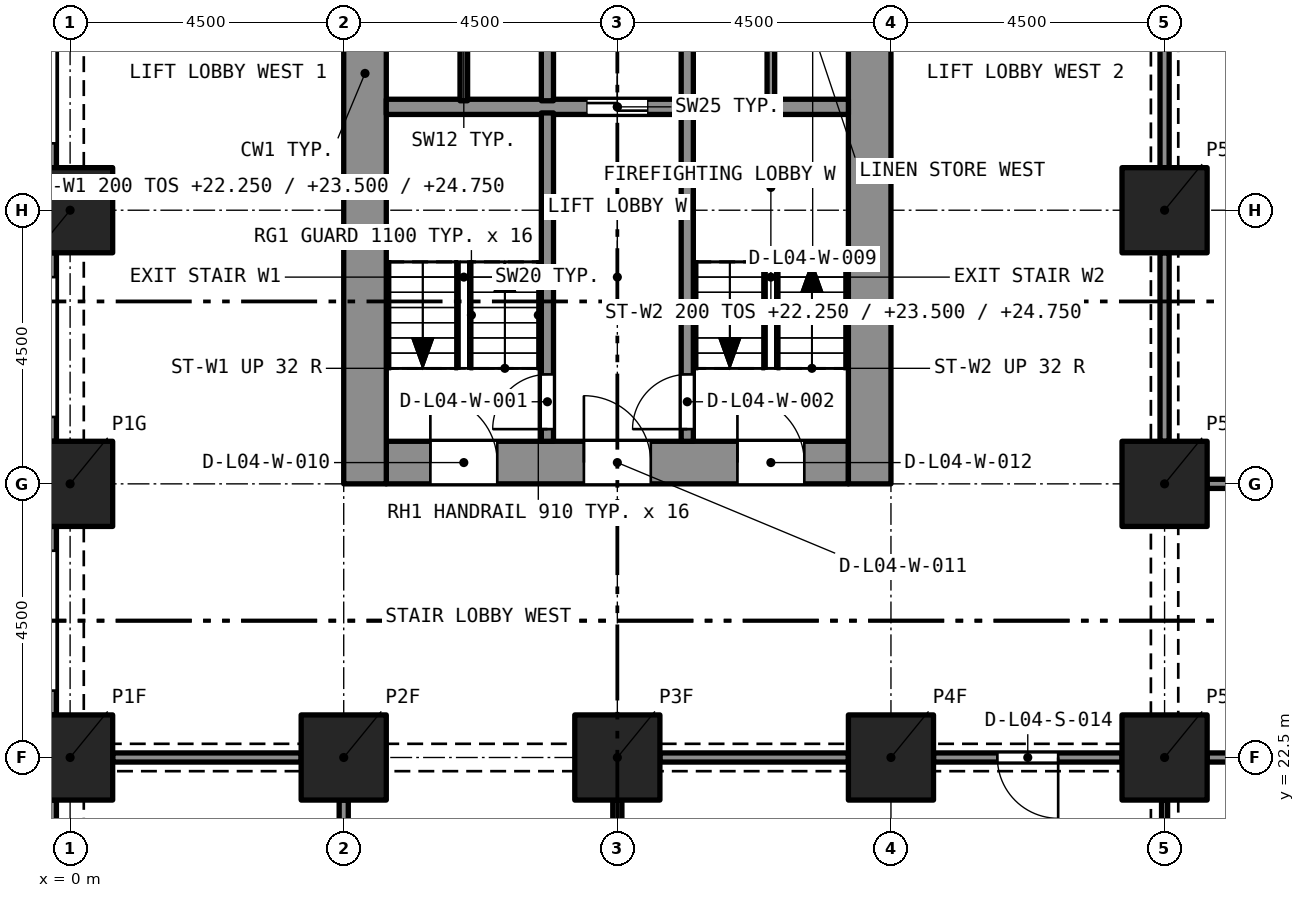
"""IFC4 building model, lengths in metres.
Left out: names, types, materials, properties, quantities, classifications, styles, units other than length and angle.
Written with IfcOpenShell. Run it as: python <this file> out.ifc"""

import sys

from ifc_helpers import new_model, si_unit, direction, frame, frame_2d, origin, origin_2d, place, context, subcontext, project, spatial, rectangle, extrude, element, fill, save


model = new_model("IFC4")
c1 = context("Model", 3, precision=1e-05, world=origin(), true_north=direction((0.0, 1.0)))
c2 = subcontext(c1, "Body", "Model", "MODEL_VIEW")
j1 = project(units=[si_unit("LENGTHUNIT", "METRE"), si_unit("PLANEANGLEUNIT", "RADIAN")], contexts=[c1])
p1 = place(None, origin())
s1 = spatial("IfcSite", under=j1, at=p1, CompositionType="ELEMENT")
p2 = place(p1, origin())
s2 = spatial("IfcBuilding", under=s1, at=p2, CompositionType="ELEMENT")
p3 = place(p2, frame((0.0, 0.0, 21.0)))
s3 = spatial("IfcBuildingStorey", under=s2, at=p3, CompositionType="ELEMENT", Elevation=21.0)
for number, where, z_axis, x_axis in (
    (1, (0.0, 22.5, 0.0), (0.0, 0.0, 1.0), (1.0, 0.0, 0.0)),
    (2, (4.5, 22.5, 0.0), (0.0, 0.0, 1.0), (1.0, 0.0, 0.0)),
    (3, (9.0, 22.5, 0.0), (0.0, 0.0, 1.0), (1.0, 0.0, 0.0)),
    (4, (13.5, 22.5, 0.0), (0.0, 0.0, 1.0), (1.0, 0.0, 0.0)),
    (5, (18.0, 22.5, 0.0), (0.0, 0.0, 1.0), (1.0, 0.0, 0.0)),
    (6, (0.0, 27.0, 0.0), (0.0, 0.0, 1.0), (1.0, 0.0, 0.0)),
    (7, (18.0, 27.0, 0.0), (0.0, 0.0, 1.0), (1.0, 0.0, 0.0)),
    (8, (0.0, 31.5, 0.0), (0.0, 0.0, 1.0), (1.0, 0.0, 0.0)),
    (9, (18.0, 31.5, 0.0), (0.0, 0.0, 1.0), (1.0, 0.0, 0.0)),
):
    element("IfcColumn", number, at=place(p3, frame(where, z_axis=z_axis, x_axis=x_axis)), inside=s3, PredefinedType="COLUMN", context=c2, shape_type="SweptSolid", body=[
        extrude(rectangle(XDim=1.4, YDim=1.4, at=origin_2d()), origin(), (0.0, 0.0, 1.0), 5.0),
    ])
p4 = place(p3, frame((5.2, 27.35, 0.0), z_axis=(0.0, 0.0, 1.0), x_axis=(1.0, 0.0, 0.0)))
e10 = element("IfcWall", 10, at=p4, inside=s3, PredefinedType="SOLIDWALL", context=c2, shape_type="SweptSolid", body=[
    extrude(rectangle(XDim=7.6, YDim=0.7, at=frame_2d((3.8, 0.0))), origin(), (0.0, 0.0, 1.0), 5.0),
])
p5 = place(p4, frame((0.725, 0.0, 0.0)))
e11 = element("IfcOpeningElement", 11, at=p5, cuts=e10, PredefinedType="OPENING", context=c2, shape_type="SweptSolid", body=[
    extrude(rectangle(XDim=1.1, YDim=2.1, at=frame_2d((0.55, 1.05))), frame((0.0, 0.36, 0.0), z_axis=(0.0, -1.0, 0.0), x_axis=(1.0, 0.0, 0.0)), (0.0, 0.0, 1.0), 0.72),
])
p6 = place(p4, frame((3.25, 0.0, 0.0)))
e12 = element("IfcOpeningElement", 12, at=p6, cuts=e10, PredefinedType="OPENING", context=c2, shape_type="SweptSolid", body=[
    extrude(rectangle(XDim=1.1, YDim=2.1, at=frame_2d((0.55, 1.05))), frame((0.0, 0.36, 0.0), z_axis=(0.0, -1.0, 0.0), x_axis=(1.0, 0.0, 0.0)), (0.0, 0.0, 1.0), 0.72),
])
p7 = place(p4, frame((5.775, 0.0, 0.0)))
e13 = element("IfcOpeningElement", 13, at=p7, cuts=e10, PredefinedType="OPENING", context=c2, shape_type="SweptSolid", body=[
    extrude(rectangle(XDim=1.1, YDim=2.1, at=frame_2d((0.55, 1.05))), frame((0.0, 0.36, 0.0), z_axis=(0.0, -1.0, 0.0), x_axis=(1.0, 0.0, 0.0)), (0.0, 0.0, 1.0), 0.72),
])
p8 = place(p3, frame((4.85, 27.0, 0.0), z_axis=(0.0, 0.0, 1.0), x_axis=(0.0, 1.0, 0.0)))
e14 = element("IfcWall", 14, at=p8, inside=s3, PredefinedType="SOLIDWALL", context=c2, shape_type="SweptSolid", body=[
    extrude(rectangle(XDim=13.5, YDim=0.7, at=frame_2d((6.75, 0.0))), origin(), (0.0, 0.0, 1.0), 5.0),
])
p9 = place(p8, frame((8.95, 0.0, 0.0)))
e15 = element("IfcOpeningElement", 15, at=p9, cuts=e14, PredefinedType="OPENING", context=c2, shape_type="SweptSolid", body=[
    extrude(rectangle(XDim=1.2, YDim=2.1, at=frame_2d((0.6, 1.05))), frame((0.0, 0.36, 0.0), z_axis=(0.0, -1.0, 0.0), x_axis=(1.0, 0.0, 0.0)), (0.0, 0.0, 1.0), 0.72),
])
p10 = place(p3, frame((13.15, 27.0, 0.0), z_axis=(0.0, 0.0, 1.0), x_axis=(0.0, 1.0, 0.0)))
e16 = element("IfcWall", 16, at=p10, inside=s3, PredefinedType="SOLIDWALL", context=c2, shape_type="SweptSolid", body=[
    extrude(rectangle(XDim=13.5, YDim=0.7, at=frame_2d((6.75, 0.0))), origin(), (0.0, 0.0, 1.0), 5.0),
])
p11 = place(p10, frame((11.1, 0.0, 0.0)))
e17 = element("IfcOpeningElement", 17, at=p11, cuts=e16, PredefinedType="OPENING", context=c2, shape_type="SweptSolid", body=[
    extrude(rectangle(XDim=1.1, YDim=2.1, at=frame_2d((0.55, 1.05))), frame((0.0, 0.36, 0.0), z_axis=(0.0, -1.0, 0.0), x_axis=(1.0, 0.0, 0.0)), (0.0, 0.0, 1.0), 0.72),
])
p12 = place(p10, frame((8.95, 0.0, 0.0)))
e18 = element("IfcOpeningElement", 18, at=p12, cuts=e16, PredefinedType="OPENING", context=c2, shape_type="SweptSolid", body=[
    extrude(rectangle(XDim=1.2, YDim=2.1, at=frame_2d((0.6, 1.05))), frame((0.0, 0.36, 0.0), z_axis=(0.0, -1.0, 0.0), x_axis=(1.0, 0.0, 0.0)), (0.0, 0.0, 1.0), 0.72),
])
p13 = place(p3, frame((-0.375, 32.2, 0.0), z_axis=(0.0, 0.0, 1.0), x_axis=(0.0, 1.0, 0.0)))
e19 = element("IfcWall", 19, at=p13, inside=s3, PredefinedType="SOLIDWALL", context=c2, shape_type="SweptSolid", body=[
    extrude(rectangle(XDim=3.1, YDim=0.3, at=frame_2d((1.55, 0.0))), origin(), (0.0, 0.0, 1.0), 5.0),
])
p14 = place(p13, frame((0.4, 0.0, 0.45)))
e20 = element("IfcOpeningElement", 20, at=p14, cuts=e19, PredefinedType="OPENING", context=c2, shape_type="SweptSolid", body=[
    extrude(rectangle(XDim=2.3, YDim=3.3, at=frame_2d((1.15, 1.65))), frame((0.0, 0.16, 0.0), z_axis=(0.0, -1.0, 0.0), x_axis=(1.0, 0.0, 0.0)), (0.0, 0.0, 1.0), 0.32),
])
p15 = place(p3, frame((-0.375, 27.7, 0.0), z_axis=(0.0, 0.0, 1.0), x_axis=(0.0, 1.0, 0.0)))
e21 = element("IfcWall", 21, at=p15, inside=s3, PredefinedType="SOLIDWALL", context=c2, shape_type="SweptSolid", body=[
    extrude(rectangle(XDim=3.1, YDim=0.3, at=frame_2d((1.55, 0.0))), origin(), (0.0, 0.0, 1.0), 5.0),
])
p16 = place(p15, frame((0.4, 0.0, 0.45)))
e22 = element("IfcOpeningElement", 22, at=p16, cuts=e21, PredefinedType="OPENING", context=c2, shape_type="SweptSolid", body=[
    extrude(rectangle(XDim=2.3, YDim=3.3, at=frame_2d((1.15, 1.65))), frame((0.0, 0.16, 0.0), z_axis=(0.0, -1.0, 0.0), x_axis=(1.0, 0.0, 0.0)), (0.0, 0.0, 1.0), 0.32),
])
p17 = place(p3, frame((-0.375, 23.2, 0.0), z_axis=(0.0, 0.0, 1.0), x_axis=(0.0, 1.0, 0.0)))
e23 = element("IfcWall", 23, at=p17, inside=s3, PredefinedType="SOLIDWALL", context=c2, shape_type="SweptSolid", body=[
    extrude(rectangle(XDim=3.1, YDim=0.3, at=frame_2d((1.55, 0.0))), origin(), (0.0, 0.0, 1.0), 5.0),
])
p18 = place(p17, frame((0.4, 0.0, 0.45)))
e24 = element("IfcOpeningElement", 24, at=p18, cuts=e23, PredefinedType="OPENING", context=c2, shape_type="SweptSolid", body=[
    extrude(rectangle(XDim=2.3, YDim=3.3, at=frame_2d((1.15, 1.65))), frame((0.0, 0.16, 0.0), z_axis=(0.0, -1.0, 0.0), x_axis=(1.0, 0.0, 0.0)), (0.0, 0.0, 1.0), 0.32),
])
p19 = place(p3, frame((-0.375, 18.7, 0.0), z_axis=(0.0, 0.0, 1.0), x_axis=(0.0, 1.0, 0.0)))
e25 = element("IfcWall", 25, at=p19, inside=s3, PredefinedType="SOLIDWALL", context=c2, shape_type="SweptSolid", body=[
    extrude(rectangle(XDim=3.1, YDim=0.3, at=frame_2d((1.55, 0.0))), origin(), (0.0, 0.0, 1.0), 5.0),
])
p20 = place(p19, frame((0.4, 0.0, 0.45)))
e26 = element("IfcOpeningElement", 26, at=p20, cuts=e25, PredefinedType="OPENING", context=c2, shape_type="SweptSolid", body=[
    extrude(rectangle(XDim=2.3, YDim=3.3, at=frame_2d((1.15, 1.65))), frame((0.0, 0.16, 0.0), z_axis=(0.0, -1.0, 0.0), x_axis=(1.0, 0.0, 0.0)), (0.0, 0.0, 1.0), 0.32),
])
p21 = place(p3, frame((5.2, 33.2, 0.0), z_axis=(0.0, 0.0, 1.0), x_axis=(1.0, 0.0, 0.0)))
e27 = element("IfcWall", 27, at=p21, inside=s3, PredefinedType="SOLIDWALL", context=c2, shape_type="SweptSolid", body=[
    extrude(rectangle(XDim=7.6, YDim=0.25, at=frame_2d((3.8, 0.0))), origin(), (0.0, 0.0, 1.0), 4.65),
])
p22 = place(p21, frame((3.3, 0.0, 0.0)))
e28 = element("IfcOpeningElement", 28, at=p22, cuts=e27, PredefinedType="OPENING", context=c2, shape_type="SweptSolid", body=[
    extrude(rectangle(XDim=1.0, YDim=2.1, at=frame_2d((0.5, 1.05))), frame((0.0, 0.135, 0.0), z_axis=(0.0, -1.0, 0.0), x_axis=(1.0, 0.0, 0.0)), (0.0, 0.0, 1.0), 0.27),
])
p23 = place(p3, frame((7.85, 27.7, 0.0), z_axis=(0.0, 0.0, 1.0), x_axis=(0.0, 1.0, 0.0)))
e29 = element("IfcWall", 29, at=p23, inside=s3, PredefinedType="SOLIDWALL", context=c2, shape_type="SweptSolid", body=[
    extrude(rectangle(XDim=5.4, YDim=0.2, at=frame_2d((2.7, 0.0))), origin(), (0.0, 0.0, 1.0), 4.65),
])
p24 = place(p23, frame((0.2, 0.0, 0.0)))
e30 = element("IfcOpeningElement", 30, at=p24, cuts=e29, PredefinedType="OPENING", context=c2, shape_type="SweptSolid", body=[
    extrude(rectangle(XDim=0.9, YDim=2.1, at=frame_2d((0.45, 1.05))), frame((0.0, 0.11, 0.0), z_axis=(0.0, -1.0, 0.0), x_axis=(1.0, 0.0, 0.0)), (0.0, 0.0, 1.0), 0.22),
])
p25 = place(p3, frame((10.15, 27.7, 0.0), z_axis=(0.0, 0.0, 1.0), x_axis=(0.0, 1.0, 0.0)))
e31 = element("IfcWall", 31, at=p25, inside=s3, PredefinedType="SOLIDWALL", context=c2, shape_type="SweptSolid", body=[
    extrude(rectangle(XDim=5.4, YDim=0.2, at=frame_2d((2.7, 0.0))), origin(), (0.0, 0.0, 1.0), 4.65),
])
p26 = place(p25, frame((0.2, 0.0, 0.0)))
e32 = element("IfcOpeningElement", 32, at=p26, cuts=e31, PredefinedType="OPENING", context=c2, shape_type="SweptSolid", body=[
    extrude(rectangle(XDim=0.9, YDim=2.1, at=frame_2d((0.45, 1.05))), frame((0.0, 0.11, 0.0), z_axis=(0.0, -1.0, 0.0), x_axis=(1.0, 0.0, 0.0)), (0.0, 0.0, 1.0), 0.22),
])
for number, where, z_axis, x_axis in (
    (33, (7.85, 33.3, 0.0), (0.0, 0.0, 1.0), (0.0, 1.0, 0.0)),
    (34, (10.15, 33.3, 0.0), (0.0, 0.0, 1.0), (0.0, 1.0, 0.0)),
):
    element("IfcWall", number, at=place(p3, frame(where, z_axis=z_axis, x_axis=x_axis)), inside=s3, PredefinedType="SOLIDWALL", context=c2, shape_type="SweptSolid", body=[
        extrude(rectangle(XDim=2.3, YDim=0.2, at=frame_2d((1.15, 0.0))), origin(), (0.0, 0.0, 1.0), 4.65),
    ])
for number, where, z_axis, x_axis in (
    (35, (6.475, 33.3, 0.0), (0.0, 0.0, 1.0), (0.0, 1.0, 0.0)),
    (36, (11.525, 33.3, 0.0), (0.0, 0.0, 1.0), (0.0, 1.0, 0.0)),
):
    element("IfcWall", number, at=place(p3, frame(where, z_axis=z_axis, x_axis=x_axis)), inside=s3, PredefinedType="PARTITIONING", context=c2, shape_type="SweptSolid", body=[
        extrude(rectangle(XDim=2.3, YDim=0.125, at=frame_2d((1.15, 0.0))), origin(), (0.0, 0.0, 1.0), 4.65),
    ])
p27 = place(p3, frame((18.7, 27.0, 0.0), z_axis=(0.0, 0.0, 1.0), x_axis=(1.0, 0.0, 0.0)))
e37 = element("IfcWall", 37, at=p27, inside=s3, PredefinedType="PARTITIONING", context=c2, shape_type="SweptSolid", body=[
    extrude(rectangle(XDim=12.1, YDim=0.15, at=frame_2d((6.05, 0.0))), origin(), (0.0, 0.0, 1.0), 4.55),
])
p28 = place(p27, frame((5.45, 0.0, 0.0)))
e38 = element("IfcOpeningElement", 38, at=p28, cuts=e37, PredefinedType="OPENING", context=c2, shape_type="SweptSolid", body=[
    extrude(rectangle(XDim=1.2, YDim=2.1, at=frame_2d((0.6, 1.05))), frame((0.0, 0.085, 0.0), z_axis=(0.0, -1.0, 0.0), x_axis=(1.0, 0.0, 0.0)), (0.0, 0.0, 1.0), 0.17),
])
p29 = place(p3, frame((30.8, 22.5, 0.0), z_axis=(0.0, 0.0, 1.0), x_axis=(-1.0, 0.0, 0.0)))
e39 = element("IfcWall", 39, at=p29, inside=s3, PredefinedType="PARTITIONING", context=c2, shape_type="SweptSolid", body=[
    extrude(rectangle(XDim=12.1, YDim=0.15, at=frame_2d((6.05, 0.0))), origin(), (0.0, 0.0, 1.0), 4.55),
])
p30 = place(p29, frame((5.45, 0.0, 0.0)))
e40 = element("IfcOpeningElement", 40, at=p30, cuts=e39, PredefinedType="OPENING", context=c2, shape_type="SweptSolid", body=[
    extrude(rectangle(XDim=1.2, YDim=2.1, at=frame_2d((0.6, 1.05))), frame((0.0, 0.085, 0.0), z_axis=(0.0, -1.0, 0.0), x_axis=(1.0, 0.0, 0.0)), (0.0, 0.0, 1.0), 0.17),
])
for number, where, z_axis, x_axis in (
    (41, (18.0, 27.7, 0.0), (0.0, 0.0, 1.0), (0.0, 1.0, 0.0)),
    (42, (18.0, 32.2, 0.0), (0.0, 0.0, 1.0), (0.0, 1.0, 0.0)),
):
    element("IfcWall", number, at=place(p3, frame(where, z_axis=z_axis, x_axis=x_axis)), inside=s3, PredefinedType="PARTITIONING", context=c2, shape_type="SweptSolid", body=[
        extrude(rectangle(XDim=3.1, YDim=0.15, at=frame_2d((1.55, 0.0))), origin(), (0.0, 0.0, 1.0), 4.18),
    ])
p31 = place(p3, frame((18.0, 18.7, 0.0), z_axis=(0.0, 0.0, 1.0), x_axis=(0.0, 1.0, 0.0)))
e43 = element("IfcWall", 43, at=p31, inside=s3, PredefinedType="PARTITIONING", context=c2, shape_type="SweptSolid", body=[
    extrude(rectangle(XDim=3.1, YDim=0.1, at=frame_2d((1.55, 0.0))), origin(), (0.0, 0.0, 1.0), 4.18),
])
p32 = place(p3, frame((17.3, 22.5, 0.0), z_axis=(0.0, 0.0, 1.0), x_axis=(-1.0, 0.0, 0.0)))
e44 = element("IfcWall", 44, at=p32, inside=s3, PredefinedType="PARTITIONING", context=c2, shape_type="SweptSolid", body=[
    extrude(rectangle(XDim=3.1, YDim=0.15, at=frame_2d((1.55, 0.0))), origin(), (0.0, 0.0, 1.0), 4.18),
])
p33 = place(p32, frame((1.05, 0.0, 0.0)))
e45 = element("IfcOpeningElement", 45, at=p33, cuts=e44, PredefinedType="OPENING", context=c2, shape_type="SweptSolid", body=[
    extrude(rectangle(XDim=1.0, YDim=2.1, at=frame_2d((0.5, 1.05))), frame((0.0, 0.085, 0.0), z_axis=(0.0, -1.0, 0.0), x_axis=(1.0, 0.0, 0.0)), (0.0, 0.0, 1.0), 0.17),
])
for number, where, z_axis, x_axis in (
    (46, (9.7, 22.5, 0.0), (0.0, 0.0, 1.0), (1.0, 0.0, 0.0)),
    (47, (0.7, 22.5, 0.0), (0.0, 0.0, 1.0), (1.0, 0.0, 0.0)),
):
    element("IfcWall", number, at=place(p3, frame(where, z_axis=z_axis, x_axis=x_axis)), inside=s3, PredefinedType="PARTITIONING", context=c2, shape_type="SweptSolid", body=[
        extrude(rectangle(XDim=3.1, YDim=0.15, at=frame_2d((1.55, 0.0))), origin(), (0.0, 0.0, 1.0), 4.18),
    ])
p34 = place(p3, frame((9.0, 21.8, 0.0), z_axis=(0.0, 0.0, 1.0), x_axis=(0.0, -1.0, 0.0)))
e48 = element("IfcWall", 48, at=p34, inside=s3, PredefinedType="PARTITIONING", context=c2, shape_type="SweptSolid", body=[
    extrude(rectangle(XDim=8.3, YDim=0.15, at=frame_2d((4.15, 0.0))), origin(), (0.0, 0.0, 1.0), 4.65),
])
p35 = place(p34, frame((3.55, 0.0, 0.0)))
e49 = element("IfcOpeningElement", 49, at=p35, cuts=e48, PredefinedType="OPENING", context=c2, shape_type="SweptSolid", body=[
    extrude(rectangle(XDim=1.2, YDim=2.1, at=frame_2d((0.6, 1.05))), frame((0.0, 0.085, 0.0), z_axis=(0.0, -1.0, 0.0), x_axis=(1.0, 0.0, 0.0)), (0.0, 0.0, 1.0), 0.17),
])
p36 = place(p3, frame((4.5, 13.5, 0.0), z_axis=(0.0, 0.0, 1.0), x_axis=(0.0, 1.0, 0.0)))
e50 = element("IfcWall", 50, at=p36, inside=s3, PredefinedType="PARTITIONING", context=c2, shape_type="SweptSolid", body=[
    extrude(rectangle(XDim=8.3, YDim=0.15, at=frame_2d((4.15, 0.0))), origin(), (0.0, 0.0, 1.0), 4.65),
])
p37 = place(p36, frame((3.75, 0.0, 0.0)))
e51 = element("IfcOpeningElement", 51, at=p37, cuts=e50, PredefinedType="OPENING", context=c2, shape_type="SweptSolid", body=[
    extrude(rectangle(XDim=0.8, YDim=2.1, at=frame_2d((0.4, 1.05))), frame((0.0, 0.085, 0.0), z_axis=(0.0, -1.0, 0.0), x_axis=(1.0, 0.0, 0.0)), (0.0, 0.0, 1.0), 0.17),
])
p38 = place(p24, origin())
e52 = element("IfcDoor", 52, at=p38, inside=s3, OperationType="SINGLE_SWING_LEFT", PredefinedType="DOOR", context=c2, shape_type="SweptSolid", body=[
    extrude(rectangle(XDim=0.9, YDim=2.1, at=frame_2d((0.45, 1.05))), frame((0.0, 0.025, 0.0), z_axis=(0.0, -1.0, 0.0), x_axis=(1.0, 0.0, 0.0)), (0.0, 0.0, 1.0), 0.05),
])
fill(e30, e52)
p39 = place(p26, origin())
e53 = element("IfcDoor", 53, at=p39, inside=s3, OperationType="SINGLE_SWING_LEFT", PredefinedType="DOOR", context=c2, shape_type="SweptSolid", body=[
    extrude(rectangle(XDim=0.9, YDim=2.1, at=frame_2d((0.45, 1.05))), frame((0.0, 0.025, 0.0), z_axis=(0.0, -1.0, 0.0), x_axis=(1.0, 0.0, 0.0)), (0.0, 0.0, 1.0), 0.05),
])
fill(e32, e53)
p40 = place(p22, origin())
e54 = element("IfcDoor", 54, at=p40, inside=s3, OperationType="SLIDING_TO_LEFT", PredefinedType="DOOR", context=c2, shape_type="SweptSolid", body=[
    extrude(rectangle(XDim=1.0, YDim=2.1, at=frame_2d((0.5, 1.05))), frame((0.0, 0.025, 0.0), z_axis=(0.0, -1.0, 0.0), x_axis=(1.0, 0.0, 0.0)), (0.0, 0.0, 1.0), 0.05),
])
fill(e28, e54)
p41 = place(p5, origin())
e55 = element("IfcDoor", 55, at=p41, inside=s3, OperationType="SINGLE_SWING_LEFT", PredefinedType="DOOR", context=c2, shape_type="SweptSolid", body=[
    extrude(rectangle(XDim=1.1, YDim=2.1, at=frame_2d((0.55, 1.05))), frame((0.0, 0.025, 0.0), z_axis=(0.0, -1.0, 0.0), x_axis=(1.0, 0.0, 0.0)), (0.0, 0.0, 1.0), 0.05),
])
fill(e11, e55)
p42 = place(p6, origin())
e56 = element("IfcDoor", 56, at=p42, inside=s3, OperationType="SINGLE_SWING_LEFT", PredefinedType="DOOR", context=c2, shape_type="SweptSolid", body=[
    extrude(rectangle(XDim=1.1, YDim=2.1, at=frame_2d((0.55, 1.05))), frame((0.0, 0.025, 0.0), z_axis=(0.0, -1.0, 0.0), x_axis=(1.0, 0.0, 0.0)), (0.0, 0.0, 1.0), 0.05),
])
fill(e12, e56)
p43 = place(p7, origin())
e57 = element("IfcDoor", 57, at=p43, inside=s3, OperationType="SINGLE_SWING_LEFT", PredefinedType="DOOR", context=c2, shape_type="SweptSolid", body=[
    extrude(rectangle(XDim=1.1, YDim=2.1, at=frame_2d((0.55, 1.05))), frame((0.0, 0.025, 0.0), z_axis=(0.0, -1.0, 0.0), x_axis=(1.0, 0.0, 0.0)), (0.0, 0.0, 1.0), 0.05),
])
fill(e13, e57)
p44 = place(p33, origin())
e58 = element("IfcDoor", 58, at=p44, inside=s3, OperationType="SINGLE_SWING_RIGHT", PredefinedType="DOOR", context=c2, shape_type="SweptSolid", body=[
    extrude(rectangle(XDim=1.0, YDim=2.1, at=frame_2d((0.5, 1.05))), frame((0.0, 0.025, 0.0), z_axis=(0.0, -1.0, 0.0), x_axis=(1.0, 0.0, 0.0)), (0.0, 0.0, 1.0), 0.05),
])
fill(e45, e58)
save(model, sys.argv[1])
